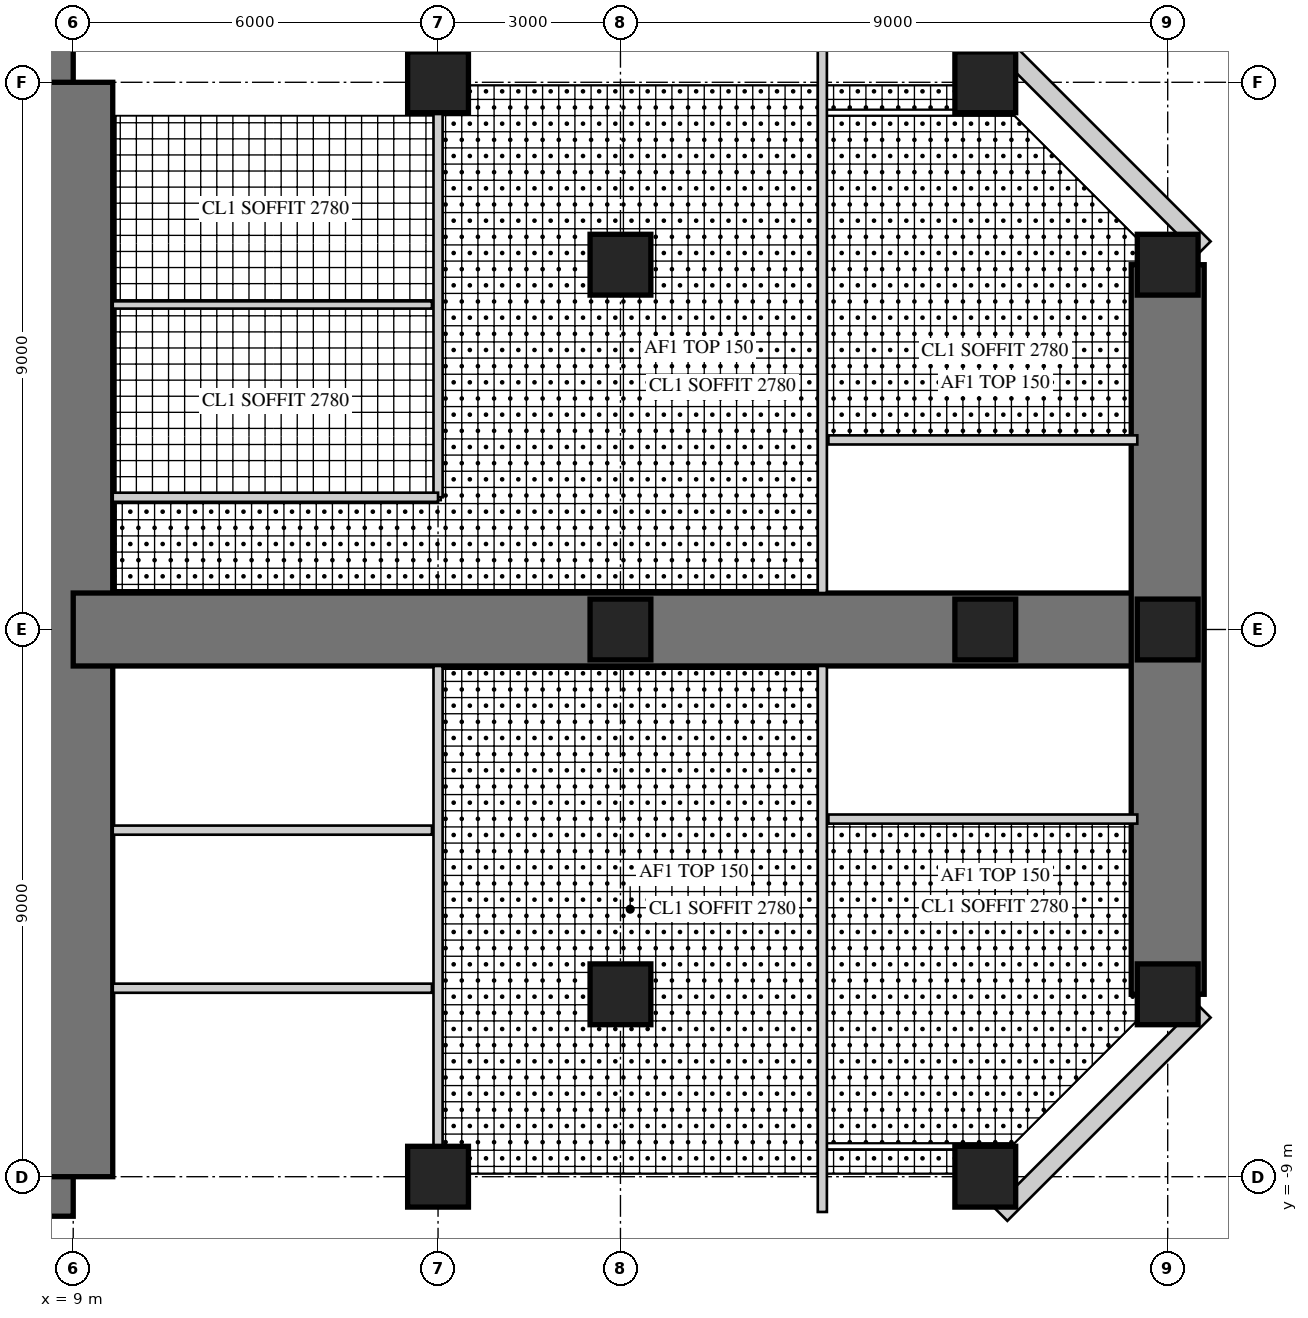
"""IFC4 building model, lengths in metres.
Left out: names, types, materials, properties, quantities, classifications, styles, units other than length and angle.
Written with IfcOpenShell. Run it as: python <this file> out.ifc"""

import sys

from ifc_helpers import new_model, si_unit, direction, frame, frame_2d, origin, origin_2d, place, context, subcontext, project, spatial, rectangle, hollow_rectangle, extrude, element, fill, save


model = new_model("IFC4")
c1 = context("Model", 3, precision=1e-05, world=origin(), true_north=direction((0.0, 1.0)))
c2 = subcontext(c1, "Body", "Model", "MODEL_VIEW")
j1 = project(units=[si_unit("LENGTHUNIT", "METRE"), si_unit("PLANEANGLEUNIT", "RADIAN")], contexts=[c1])
p1 = place(None, origin())
s1 = spatial("IfcSite", under=j1, at=p1, CompositionType="ELEMENT")
p2 = place(p1, origin())
s2 = spatial("IfcBuilding", under=s1, at=p2, CompositionType="ELEMENT")
p3 = place(p2, frame((0.0, 0.0, 124.5)))
s3 = spatial("IfcBuildingStorey", under=s2, at=p3, CompositionType="ELEMENT", Elevation=124.5)
p4 = place(p3, frame((9.0, 9.0, 0.0), z_axis=(0.0, 0.0, 1.0), x_axis=(-1.0, 0.0, 0.0)))
e1 = element("IfcWall", 1, at=p4, inside=s3, PredefinedType="SHEAR", context=c2, shape_type="SweptSolid", body=[
    extrude(rectangle(XDim=18.0, YDim=1.3, at=frame_2d((9.0, 0.0))), origin(), (0.0, 0.0, 1.0), 4.0),
])
p5 = place(p4, frame((9.8, 0.0, 0.0)))
e2 = element("IfcOpeningElement", 2, at=p5, cuts=e1, PredefinedType="OPENING", context=c2, shape_type="SweptSolid", body=[
    extrude(rectangle(XDim=1.0, YDim=2.4, at=frame_2d((0.5, 1.2))), frame((0.0, 0.66, 0.0), z_axis=(0.0, -1.0, 0.0), x_axis=(1.0, 0.0, 0.0)), (0.0, 0.0, 1.0), 1.32),
])
p6 = place(p3, frame((-9.0, -9.0, 0.0), z_axis=(0.0, 0.0, 1.0), x_axis=(1.0, 0.0, 0.0)))
e3 = element("IfcWall", 3, at=p6, inside=s3, PredefinedType="SHEAR", context=c2, shape_type="SweptSolid", body=[
    extrude(rectangle(XDim=18.0, YDim=1.3, at=frame_2d((9.0, 0.0))), origin(), (0.0, 0.0, 1.0), 4.0),
])
p7 = place(p6, frame((9.8, 0.0, 0.0)))
e4 = element("IfcOpeningElement", 4, at=p7, cuts=e3, PredefinedType="OPENING", context=c2, shape_type="SweptSolid", body=[
    extrude(rectangle(XDim=1.0, YDim=2.4, at=frame_2d((0.5, 1.2))), frame((0.0, 0.66, 0.0), z_axis=(0.0, -1.0, 0.0), x_axis=(1.0, 0.0, 0.0)), (0.0, 0.0, 1.0), 1.32),
])
p8 = place(p3, frame((9.0, -9.0, 0.0), z_axis=(0.0, 0.0, 1.0), x_axis=(0.0, 1.0, 0.0)))
e5 = element("IfcWall", 5, at=p8, inside=s3, PredefinedType="SHEAR", context=c2, shape_type="SweptSolid", body=[
    extrude(rectangle(XDim=18.0, YDim=1.3, at=frame_2d((9.0, 0.0))), origin(), (0.0, 0.0, 1.0), 4.0),
])
p9 = place(p8, frame((9.8, 0.0, 0.0)))
e6 = element("IfcOpeningElement", 6, at=p9, cuts=e5, PredefinedType="OPENING", context=c2, shape_type="SweptSolid", body=[
    extrude(rectangle(XDim=1.0, YDim=2.4, at=frame_2d((0.5, 1.2))), frame((0.0, 0.66, 0.0), z_axis=(0.0, -1.0, 0.0), x_axis=(1.0, 0.0, 0.0)), (0.0, 0.0, 1.0), 1.32),
])
p10 = place(p3, frame((9.0, 0.0, 0.0), z_axis=(0.0, 0.0, 1.0), x_axis=(1.0, 0.0, 0.0)))
e7 = element("IfcWall", 7, at=p10, inside=s3, PredefinedType="SHEAR", context=c2, shape_type="SweptSolid", body=[
    extrude(rectangle(XDim=18.0, YDim=1.2, at=frame_2d((9.0, 0.0))), origin(), (0.0, 0.0, 1.0), 4.0),
])
p11 = place(p10, frame((9.8, 0.0, 0.0)))
e8 = element("IfcOpeningElement", 8, at=p11, cuts=e7, PredefinedType="OPENING", context=c2, shape_type="SweptSolid", body=[
    extrude(rectangle(XDim=1.0, YDim=2.2, at=frame_2d((0.5, 1.1))), frame((0.0, 0.61, 0.0), z_axis=(0.0, -1.0, 0.0), x_axis=(1.0, 0.0, 0.0)), (0.0, 0.0, 1.0), 1.22),
])
p12 = place(p3, frame((27.0, -6.0, 0.0), z_axis=(0.0, 0.0, 1.0), x_axis=(0.0, 1.0, 0.0)))
e9 = element("IfcWall", 9, at=p12, inside=s3, PredefinedType="SHEAR", context=c2, shape_type="SweptSolid", body=[
    extrude(rectangle(XDim=12.0, YDim=1.2, at=frame_2d((6.0, 0.0))), origin(), (0.0, 0.0, 1.0), 4.0),
])
p13 = place(p12, frame((1.55, 0.0, 0.6)))
e10 = element("IfcOpeningElement", 10, at=p13, cuts=e9, PredefinedType="OPENING", context=c2, shape_type="SweptSolid", body=[
    extrude(rectangle(XDim=3.0, YDim=2.4, at=frame_2d((1.5, 1.2))), frame((0.0, 0.61, 0.0), z_axis=(0.0, -1.0, 0.0), x_axis=(1.0, 0.0, 0.0)), (0.0, 0.0, 1.0), 1.22),
])
p14 = place(p12, frame((7.45, 0.0, 0.6)))
e11 = element("IfcOpeningElement", 11, at=p14, cuts=e9, PredefinedType="OPENING", context=c2, shape_type="SweptSolid", body=[
    extrude(rectangle(XDim=3.0, YDim=2.4, at=frame_2d((1.5, 1.2))), frame((0.0, 0.61, 0.0), z_axis=(0.0, -1.0, 0.0), x_axis=(1.0, 0.0, 0.0)), (0.0, 0.0, 1.0), 1.22),
])
for number, where, z_axis, x_axis in (
    (12, (15.0, -9.0, 0.0), (0.0, 0.0, 1.0), (1.0, 0.0, 0.0)),
    (13, (24.0, -9.0, 0.0), (0.0, 0.0, 1.0), (1.0, 0.0, 0.0)),
    (14, (15.0, 9.0, 0.0), (0.0, 0.0, 1.0), (1.0, 0.0, 0.0)),
    (15, (24.0, 9.0, 0.0), (0.0, 0.0, 1.0), (1.0, 0.0, 0.0)),
    (16, (27.0, -6.0, 0.0), (0.0, 0.0, 1.0), (1.0, 0.0, 0.0)),
    (17, (27.0, 0.0, 0.0), (0.0, 0.0, 1.0), (1.0, 0.0, 0.0)),
    (18, (27.0, 6.0, 0.0), (0.0, 0.0, 1.0), (1.0, 0.0, 0.0)),
    (19, (18.0, -6.0, 0.0), (0.0, 0.0, 1.0), (1.0, 0.0, 0.0)),
    (20, (18.0, 0.0, 0.0), (0.0, 0.0, 1.0), (1.0, 0.0, 0.0)),
    (21, (18.0, 6.0, 0.0), (0.0, 0.0, 1.0), (1.0, 0.0, 0.0)),
    (22, (24.0, 0.0, 0.0), (0.0, 0.0, 1.0), (1.0, 0.0, 0.0)),
):
    element("IfcColumn", number, at=place(p3, frame(where, z_axis=z_axis, x_axis=x_axis)), inside=s3, PredefinedType="COLUMN", context=c2, shape_type="SweptSolid", body=[
        extrude(rectangle(XDim=1.0, YDim=1.0, at=origin_2d()), origin(), (0.0, 0.0, 1.0), 4.0),
    ])
p15 = place(p3, frame((24.257, -9.62, 0.0), z_axis=(0.0, 0.0, 1.0), x_axis=(0.707106781187, 0.707106781187, 0.0)))
e23 = element("IfcWall", 23, at=p15, inside=s3, PredefinedType="SOLIDWALL", context=c2, shape_type="SweptSolid", body=[
    extrude(rectangle(XDim=4.728, YDim=0.3, at=frame_2d((2.364, 0.0))), origin(), (0.0, 0.0, 1.0), 3.8),
])
p16 = place(p15, frame((1.914, 0.0, 0.3)))
e24 = element("IfcOpeningElement", 24, at=p16, cuts=e23, PredefinedType="OPENING", context=c2, shape_type="SweptSolid", body=[
    extrude(rectangle(XDim=0.9, YDim=2.4, at=frame_2d((0.45, 1.2))), frame((0.0, 0.16, 0.0), z_axis=(0.0, -1.0, 0.0), x_axis=(1.0, 0.0, 0.0)), (0.0, 0.0, 1.0), 0.32),
])
p17 = place(p3, frame((27.6, 6.277, 0.0), z_axis=(0.0, 0.0, 1.0), x_axis=(-0.707106781187, 0.707106781187, 0.0)))
e25 = element("IfcWall", 25, at=p17, inside=s3, PredefinedType="SOLIDWALL", context=c2, shape_type="SweptSolid", body=[
    extrude(rectangle(XDim=4.728, YDim=0.3, at=frame_2d((2.364, 0.0))), origin(), (0.0, 0.0, 1.0), 3.8),
])
p18 = place(p17, frame((1.914, 0.0, 0.3)))
e26 = element("IfcOpeningElement", 26, at=p18, cuts=e25, PredefinedType="OPENING", context=c2, shape_type="SweptSolid", body=[
    extrude(rectangle(XDim=0.9, YDim=2.4, at=frame_2d((0.45, 1.2))), frame((0.0, 0.16, 0.0), z_axis=(0.0, -1.0, 0.0), x_axis=(1.0, 0.0, 0.0)), (0.0, 0.0, 1.0), 0.32),
])
p19 = place(p3, frame((15.0, 2.175, 0.0), z_axis=(0.0, 0.0, 1.0), x_axis=(0.0, 1.0, 0.0)))
e27 = element("IfcWall", 27, at=p19, inside=s3, PredefinedType="PARTITIONING", context=c2, shape_type="SweptSolid", body=[
    extrude(rectangle(XDim=6.325, YDim=0.15, at=frame_2d((3.163, 0.0))), origin(), (0.0, 0.0, 1.0), 3.0),
])
p20 = place(p19, frame((1.081, 0.0, 0.0)))
e28 = element("IfcOpeningElement", 28, at=p20, cuts=e27, PredefinedType="OPENING", context=c2, shape_type="SweptSolid", body=[
    extrude(rectangle(XDim=1.0, YDim=2.1, at=frame_2d((0.5, 1.05))), frame((0.0, 0.085, 0.0), z_axis=(0.0, -1.0, 0.0), x_axis=(1.0, 0.0, 0.0)), (0.0, 0.0, 1.0), 0.17),
])
p21 = place(p19, frame((4.244, 0.0, 0.0)))
e29 = element("IfcOpeningElement", 29, at=p21, cuts=e27, PredefinedType="OPENING", context=c2, shape_type="SweptSolid", body=[
    extrude(rectangle(XDim=1.0, YDim=2.1, at=frame_2d((0.5, 1.05))), frame((0.0, 0.085, 0.0), z_axis=(0.0, -1.0, 0.0), x_axis=(1.0, 0.0, 0.0)), (0.0, 0.0, 1.0), 0.17),
])
p22 = place(p3, frame((9.65, 2.175, 0.0), z_axis=(0.0, 0.0, 1.0), x_axis=(1.0, 0.0, 0.0)))
e30 = element("IfcWall", 30, at=p22, inside=s3, PredefinedType="PARTITIONING", context=c2, shape_type="SweptSolid", body=[
    extrude(rectangle(XDim=5.35, YDim=0.15, at=frame_2d((2.675, 0.0))), origin(), (0.0, 0.0, 1.0), 3.8),
])
p23 = place(p3, frame((9.65, 5.337, 0.0), z_axis=(0.0, 0.0, 1.0), x_axis=(1.0, 0.0, 0.0)))
e31 = element("IfcWall", 31, at=p23, inside=s3, PredefinedType="PLUMBINGWALL", context=c2, shape_type="SweptSolid", body=[
    extrude(rectangle(XDim=5.25, YDim=0.12, at=frame_2d((2.625, 0.0))), origin(), (0.0, 0.0, 1.0), 3.8),
])
p24 = place(p3, frame((15.0, -8.5, 0.0), z_axis=(0.0, 0.0, 1.0), x_axis=(0.0, 1.0, 0.0)))
e32 = element("IfcWall", 32, at=p24, inside=s3, PredefinedType="PARTITIONING", context=c2, shape_type="SweptSolid", body=[
    extrude(rectangle(XDim=7.9, YDim=0.15, at=frame_2d((3.95, 0.0))), origin(), (0.0, 0.0, 1.0), 3.0),
])
p25 = place(p24, frame((0.8, 0.0, 0.0)))
e33 = element("IfcOpeningElement", 33, at=p25, cuts=e32, PredefinedType="OPENING", context=c2, shape_type="SweptSolid", body=[
    extrude(rectangle(XDim=1.0, YDim=2.1, at=frame_2d((0.5, 1.05))), frame((0.0, 0.085, 0.0), z_axis=(0.0, -1.0, 0.0), x_axis=(1.0, 0.0, 0.0)), (0.0, 0.0, 1.0), 0.17),
])
p26 = place(p24, frame((3.4, 0.0, 0.0)))
e34 = element("IfcOpeningElement", 34, at=p26, cuts=e32, PredefinedType="OPENING", context=c2, shape_type="SweptSolid", body=[
    extrude(rectangle(XDim=1.0, YDim=2.1, at=frame_2d((0.5, 1.05))), frame((0.0, 0.085, 0.0), z_axis=(0.0, -1.0, 0.0), x_axis=(1.0, 0.0, 0.0)), (0.0, 0.0, 1.0), 0.17),
])
p27 = place(p24, frame((6.05, 0.0, 0.0)))
e35 = element("IfcOpeningElement", 35, at=p27, cuts=e32, PredefinedType="OPENING", context=c2, shape_type="SweptSolid", body=[
    extrude(rectangle(XDim=1.0, YDim=2.1, at=frame_2d((0.5, 1.05))), frame((0.0, 0.085, 0.0), z_axis=(0.0, -1.0, 0.0), x_axis=(1.0, 0.0, 0.0)), (0.0, 0.0, 1.0), 0.17),
])
p28 = place(p3, frame((9.65, -3.3, 0.0), z_axis=(0.0, 0.0, 1.0), x_axis=(1.0, 0.0, 0.0)))
e36 = element("IfcWall", 36, at=p28, inside=s3, PredefinedType="PARTITIONING", context=c2, shape_type="SweptSolid", body=[
    extrude(rectangle(XDim=5.25, YDim=0.15, at=frame_2d((2.625, 0.0))), origin(), (0.0, 0.0, 1.0), 3.8),
])
p29 = place(p3, frame((9.65, -5.9, 0.0), z_axis=(0.0, 0.0, 1.0), x_axis=(1.0, 0.0, 0.0)))
e37 = element("IfcWall", 37, at=p29, inside=s3, PredefinedType="PARTITIONING", context=c2, shape_type="SweptSolid", body=[
    extrude(rectangle(XDim=5.25, YDim=0.15, at=frame_2d((2.625, 0.0))), origin(), (0.0, 0.0, 1.0), 3.1),
])
p30 = place(p3, frame((21.42, 3.118, 0.0), z_axis=(0.0, 0.0, 1.0), x_axis=(1.0, 0.0, 0.0)))
e38 = element("IfcWall", 38, at=p30, inside=s3, PredefinedType="PARTITIONING", context=c2, shape_type="SweptSolid", body=[
    extrude(rectangle(XDim=5.08, YDim=0.15, at=frame_2d((2.54, 0.0))), origin(), (0.0, 0.0, 1.0), 3.8),
])
p31 = place(p3, frame((21.32, 0.6, 0.0), z_axis=(0.0, 0.0, 1.0), x_axis=(0.0, 1.0, 0.0)))
e39 = element("IfcWall", 39, at=p31, inside=s3, PredefinedType="PARTITIONING", context=c2, shape_type="SweptSolid", body=[
    extrude(rectangle(XDim=8.98, YDim=0.15, at=frame_2d((4.49, 0.0))), origin(), (0.0, 0.0, 1.0), 3.8),
])
p32 = place(p31, frame((0.35, 0.0, 0.0)))
e40 = element("IfcOpeningElement", 40, at=p32, cuts=e39, PredefinedType="OPENING", context=c2, shape_type="SweptSolid", body=[
    extrude(rectangle(XDim=1.0, YDim=2.2, at=frame_2d((0.5, 1.1))), frame((0.0, 0.085, 0.0), z_axis=(0.0, -1.0, 0.0), x_axis=(1.0, 0.0, 0.0)), (0.0, 0.0, 1.0), 0.17),
])
p33 = place(p31, frame((2.993, 0.0, 0.0)))
e41 = element("IfcOpeningElement", 41, at=p33, cuts=e39, PredefinedType="OPENING", context=c2, shape_type="SweptSolid", body=[
    extrude(rectangle(XDim=1.0, YDim=2.2, at=frame_2d((0.5, 1.1))), frame((0.0, 0.085, 0.0), z_axis=(0.0, -1.0, 0.0), x_axis=(1.0, 0.0, 0.0)), (0.0, 0.0, 1.0), 0.17),
])
p34 = place(p3, frame((21.42, -3.118, 0.0), z_axis=(0.0, 0.0, 1.0), x_axis=(1.0, 0.0, 0.0)))
e42 = element("IfcWall", 42, at=p34, inside=s3, PredefinedType="PARTITIONING", context=c2, shape_type="SweptSolid", body=[
    extrude(rectangle(XDim=5.08, YDim=0.15, at=frame_2d((2.54, 0.0))), origin(), (0.0, 0.0, 1.0), 3.8),
])
p35 = place(p3, frame((21.32, -9.58, 0.0), z_axis=(0.0, 0.0, 1.0), x_axis=(0.0, 1.0, 0.0)))
e43 = element("IfcWall", 43, at=p35, inside=s3, PredefinedType="PARTITIONING", context=c2, shape_type="SweptSolid", body=[
    extrude(rectangle(XDim=8.98, YDim=0.15, at=frame_2d((4.49, 0.0))), origin(), (0.0, 0.0, 1.0), 3.8),
])
p36 = place(p35, frame((4.987, 0.0, 0.0)))
e44 = element("IfcOpeningElement", 44, at=p36, cuts=e43, PredefinedType="OPENING", context=c2, shape_type="SweptSolid", body=[
    extrude(rectangle(XDim=1.0, YDim=2.2, at=frame_2d((0.5, 1.1))), frame((0.0, 0.085, 0.0), z_axis=(0.0, -1.0, 0.0), x_axis=(1.0, 0.0, 0.0)), (0.0, 0.0, 1.0), 0.17),
])
p37 = place(p35, frame((7.63, 0.0, 0.0)))
e45 = element("IfcOpeningElement", 45, at=p37, cuts=e43, PredefinedType="OPENING", context=c2, shape_type="SweptSolid", body=[
    extrude(rectangle(XDim=1.0, YDim=2.2, at=frame_2d((0.5, 1.1))), frame((0.0, 0.085, 0.0), z_axis=(0.0, -1.0, 0.0), x_axis=(1.0, 0.0, 0.0)), (0.0, 0.0, 1.0), 0.17),
])
p38 = place(p16, origin())
e46 = element("IfcWindow", 46, at=p38, inside=s3, PartitioningType="SINGLE_PANEL", PredefinedType="WINDOW", context=c2, shape_type="SweptSolid", body=[
    extrude(hollow_rectangle(XDim=0.9, YDim=2.4, WallThickness=0.06, at=frame_2d((0.45, 1.2))), frame((0.0, 0.03, 0.0), z_axis=(0.0, -1.0, 0.0), x_axis=(1.0, 0.0, 0.0)), (0.0, 0.0, 1.0), 0.06),
    extrude(rectangle(XDim=0.779, YDim=2.279, at=frame_2d((0.45, 1.2))), frame((0.0, 0.03, 0.0), z_axis=(0.0, -1.0, 0.0), x_axis=(1.0, 0.0, 0.0)), (0.0, 0.0, 1.0), 0.06),
])
fill(e24, e46)
p39 = place(p13, origin())
e47 = element("IfcWindow", 47, at=p39, inside=s3, PartitioningType="SINGLE_PANEL", PredefinedType="WINDOW", context=c2, shape_type="SweptSolid", body=[
    extrude(hollow_rectangle(XDim=3.0, YDim=2.4, WallThickness=0.06, at=frame_2d((1.5, 1.2))), frame((0.0, 0.03, 0.0), z_axis=(0.0, -1.0, 0.0), x_axis=(1.0, 0.0, 0.0)), (0.0, 0.0, 1.0), 0.06),
    extrude(rectangle(XDim=2.879, YDim=2.279, at=frame_2d((1.5, 1.2))), frame((0.0, 0.03, 0.0), z_axis=(0.0, -1.0, 0.0), x_axis=(1.0, 0.0, 0.0)), (0.0, 0.0, 1.0), 0.06),
])
fill(e10, e47)
p40 = place(p14, origin())
e48 = element("IfcWindow", 48, at=p40, inside=s3, PartitioningType="SINGLE_PANEL", PredefinedType="WINDOW", context=c2, shape_type="SweptSolid", body=[
    extrude(hollow_rectangle(XDim=3.0, YDim=2.4, WallThickness=0.06, at=frame_2d((1.5, 1.2))), frame((0.0, 0.03, 0.0), z_axis=(0.0, -1.0, 0.0), x_axis=(1.0, 0.0, 0.0)), (0.0, 0.0, 1.0), 0.06),
    extrude(rectangle(XDim=2.879, YDim=2.279, at=frame_2d((1.5, 1.2))), frame((0.0, 0.03, 0.0), z_axis=(0.0, -1.0, 0.0), x_axis=(1.0, 0.0, 0.0)), (0.0, 0.0, 1.0), 0.06),
])
fill(e11, e48)
p41 = place(p18, origin())
e49 = element("IfcWindow", 49, at=p41, inside=s3, PartitioningType="SINGLE_PANEL", PredefinedType="WINDOW", context=c2, shape_type="SweptSolid", body=[
    extrude(hollow_rectangle(XDim=0.9, YDim=2.4, WallThickness=0.06, at=frame_2d((0.45, 1.2))), frame((0.0, 0.03, 0.0), z_axis=(0.0, -1.0, 0.0), x_axis=(1.0, 0.0, 0.0)), (0.0, 0.0, 1.0), 0.06),
    extrude(rectangle(XDim=0.779, YDim=2.279, at=frame_2d((0.45, 1.2))), frame((0.0, 0.03, 0.0), z_axis=(0.0, -1.0, 0.0), x_axis=(1.0, 0.0, 0.0)), (0.0, 0.0, 1.0), 0.06),
])
fill(e26, e49)
p42 = place(p20, origin())
e50 = element("IfcDoor", 50, at=p42, inside=s3, OperationType="SINGLE_SWING_LEFT", PredefinedType="DOOR", context=c2, shape_type="SweptSolid", body=[
    extrude(rectangle(XDim=1.0, YDim=2.1, at=frame_2d((0.5, 1.05))), frame((0.0, 0.025, 0.0), z_axis=(0.0, -1.0, 0.0), x_axis=(1.0, 0.0, 0.0)), (0.0, 0.0, 1.0), 0.05),
])
fill(e28, e50)
p43 = place(p21, origin())
e51 = element("IfcDoor", 51, at=p43, inside=s3, OperationType="SINGLE_SWING_LEFT", PredefinedType="DOOR", context=c2, shape_type="SweptSolid", body=[
    extrude(rectangle(XDim=1.0, YDim=2.1, at=frame_2d((0.5, 1.05))), frame((0.0, 0.025, 0.0), z_axis=(0.0, -1.0, 0.0), x_axis=(1.0, 0.0, 0.0)), (0.0, 0.0, 1.0), 0.05),
])
fill(e29, e51)
p44 = place(p25, origin())
e52 = element("IfcDoor", 52, at=p44, inside=s3, OperationType="SINGLE_SWING_RIGHT", PredefinedType="DOOR", context=c2, shape_type="SweptSolid", body=[
    extrude(rectangle(XDim=1.0, YDim=2.1, at=frame_2d((0.5, 1.05))), frame((0.0, 0.025, 0.0), z_axis=(0.0, -1.0, 0.0), x_axis=(1.0, 0.0, 0.0)), (0.0, 0.0, 1.0), 0.05),
])
fill(e33, e52)
p45 = place(p26, origin())
e53 = element("IfcDoor", 53, at=p45, inside=s3, OperationType="SINGLE_SWING_LEFT", PredefinedType="DOOR", context=c2, shape_type="SweptSolid", body=[
    extrude(rectangle(XDim=1.0, YDim=2.1, at=frame_2d((0.5, 1.05))), frame((0.0, 0.025, 0.0), z_axis=(0.0, -1.0, 0.0), x_axis=(1.0, 0.0, 0.0)), (0.0, 0.0, 1.0), 0.05),
])
fill(e34, e53)
p46 = place(p27, origin())
e54 = element("IfcDoor", 54, at=p46, inside=s3, OperationType="SINGLE_SWING_LEFT", PredefinedType="DOOR", context=c2, shape_type="SweptSolid", body=[
    extrude(rectangle(XDim=1.0, YDim=2.1, at=frame_2d((0.5, 1.05))), frame((0.0, 0.025, 0.0), z_axis=(0.0, -1.0, 0.0), x_axis=(1.0, 0.0, 0.0)), (0.0, 0.0, 1.0), 0.05),
])
fill(e35, e54)
p47 = place(p32, frame((1.0, 0.0, 0.0), z_axis=(0.0, 0.0, 1.0), x_axis=(-1.0, 0.0, 0.0)))
e55 = element("IfcDoor", 55, at=p47, inside=s3, OperationType="SINGLE_SWING_RIGHT", PredefinedType="DOOR", context=c2, shape_type="SweptSolid", body=[
    extrude(rectangle(XDim=1.0, YDim=2.2, at=frame_2d((0.5, 1.1))), frame((0.0, 0.025, 0.0), z_axis=(0.0, -1.0, 0.0), x_axis=(1.0, 0.0, 0.0)), (0.0, 0.0, 1.0), 0.05),
])
fill(e40, e55)
p48 = place(p33, frame((1.0, 0.0, 0.0), z_axis=(0.0, 0.0, 1.0), x_axis=(-1.0, 0.0, 0.0)))
e56 = element("IfcDoor", 56, at=p48, inside=s3, OperationType="SINGLE_SWING_RIGHT", PredefinedType="DOOR", context=c2, shape_type="SweptSolid", body=[
    extrude(rectangle(XDim=1.0, YDim=2.2, at=frame_2d((0.5, 1.1))), frame((0.0, 0.025, 0.0), z_axis=(0.0, -1.0, 0.0), x_axis=(1.0, 0.0, 0.0)), (0.0, 0.0, 1.0), 0.05),
])
fill(e41, e56)
p49 = place(p36, frame((1.0, 0.0, 0.0), z_axis=(0.0, 0.0, 1.0), x_axis=(-1.0, 0.0, 0.0)))
e57 = element("IfcDoor", 57, at=p49, inside=s3, OperationType="SINGLE_SWING_LEFT", PredefinedType="DOOR", context=c2, shape_type="SweptSolid", body=[
    extrude(rectangle(XDim=1.0, YDim=2.2, at=frame_2d((0.5, 1.1))), frame((0.0, 0.025, 0.0), z_axis=(0.0, -1.0, 0.0), x_axis=(1.0, 0.0, 0.0)), (0.0, 0.0, 1.0), 0.05),
])
fill(e44, e57)
p50 = place(p37, frame((1.0, 0.0, 0.0), z_axis=(0.0, 0.0, 1.0), x_axis=(-1.0, 0.0, 0.0)))
e58 = element("IfcDoor", 58, at=p50, inside=s3, OperationType="SINGLE_SWING_LEFT", PredefinedType="DOOR", context=c2, shape_type="SweptSolid", body=[
    extrude(rectangle(XDim=1.0, YDim=2.2, at=frame_2d((0.5, 1.1))), frame((0.0, 0.025, 0.0), z_axis=(0.0, -1.0, 0.0), x_axis=(1.0, 0.0, 0.0)), (0.0, 0.0, 1.0), 0.05),
])
fill(e45, e58)
p51 = place(p11, frame((1.0, 0.0, 0.0), z_axis=(0.0, 0.0, 1.0), x_axis=(-1.0, 0.0, 0.0)))
e59 = element("IfcDoor", 59, at=p51, inside=s3, OperationType="SINGLE_SWING_LEFT", PredefinedType="DOOR", context=c2, shape_type="SweptSolid", body=[
    extrude(rectangle(XDim=1.0, YDim=2.2, at=frame_2d((0.5, 1.1))), frame((0.0, 0.025, 0.0), z_axis=(0.0, -1.0, 0.0), x_axis=(1.0, 0.0, 0.0)), (0.0, 0.0, 1.0), 0.05),
])
fill(e8, e59)
p52 = place(p9, frame((1.0, 0.0, 0.0), z_axis=(0.0, 0.0, 1.0), x_axis=(-1.0, 0.0, 0.0)))
e60 = element("IfcDoor", 60, at=p52, inside=s3, OperationType="SINGLE_SWING_RIGHT", PredefinedType="DOOR", context=c2, shape_type="SweptSolid", body=[
    extrude(rectangle(XDim=1.0, YDim=2.4, at=frame_2d((0.5, 1.2))), frame((0.0, -0.005, 0.0), z_axis=(0.0, -1.0, 0.0), x_axis=(1.0, 0.0, 0.0)), (0.0, 0.0, 1.0), 0.05),
])
fill(e6, e60)
save(model, sys.argv[1])
